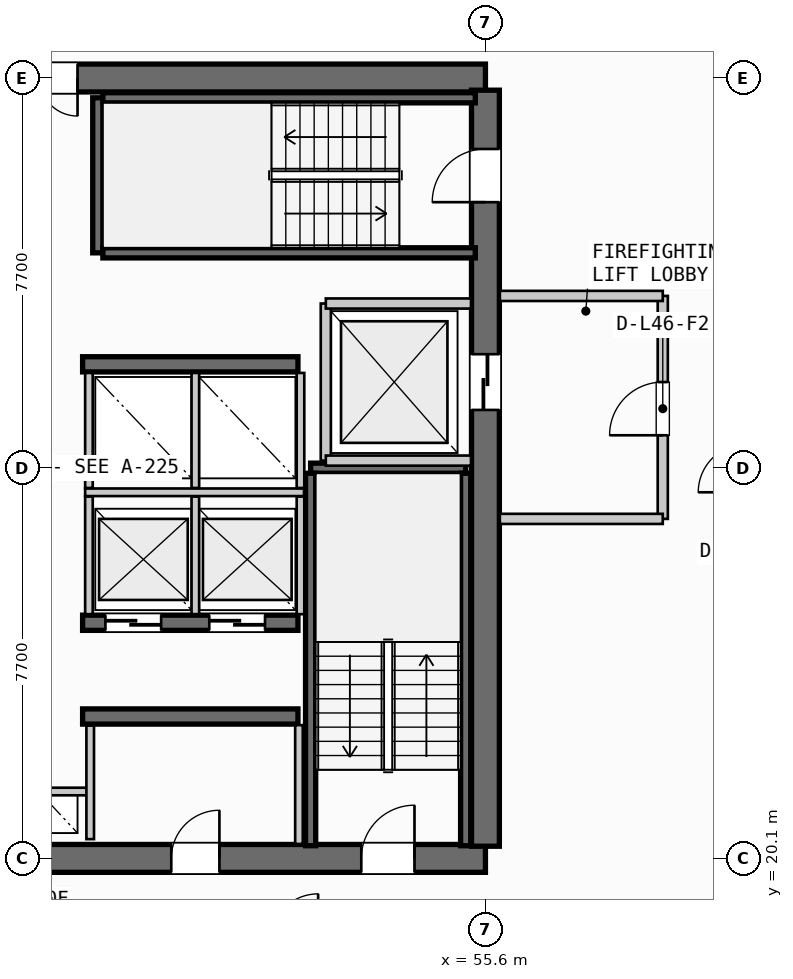
"""IFC4 building model, lengths in metres.
Left out: names, types, materials, properties, quantities, classifications, styles, units other than length and angle.
Written with IfcOpenShell. Run it as: python <this file> out.ifc"""

import sys

from ifc_helpers import new_model, si_unit, direction, frame, frame_2d, origin, place, context, subcontext, project, spatial, rectangle, extrude, source, transform, mapped, element, fill, save


model = new_model("IFC4")
c1 = context("Model", 3, precision=1e-05, world=origin(), true_north=direction((0.0, 1.0)))
c2 = subcontext(c1, "Body", "Model", "MODEL_VIEW")
j1 = project(units=[si_unit("LENGTHUNIT", "METRE"), si_unit("PLANEANGLEUNIT", "RADIAN")], contexts=[c1])
p1 = place(None, origin())
s1 = spatial("IfcSite", under=j1, at=p1, CompositionType="ELEMENT")
p2 = place(p1, origin())
s2 = spatial("IfcBuilding", under=s1, at=p2, CompositionType="ELEMENT")
p3 = place(p2, frame((0.0, 0.0, 179.9)))
s3 = spatial("IfcBuildingStorey", under=s2, at=p3, CompositionType="ELEMENT", Elevation=179.9)
p4 = place(p3, frame((38.0, 20.1, 0.0), z_axis=(0.0, 0.0, 1.0), x_axis=(1.0, 0.0, 0.0)))
e1 = element("IfcWall", 1, at=p4, inside=s3, PredefinedType="SHEAR", context=c2, shape_type="SweptSolid", body=[
    extrude(rectangle(XDim=17.6, YDim=0.55, at=frame_2d((8.8, 0.0))), origin(), (0.0, 0.0, 1.0), 3.26),
])
p5 = place(p4, frame((1.4, 0.0, 0.0)))
e2 = element("IfcOpeningElement", 2, at=p5, cuts=e1, PredefinedType="OPENING", context=c2, shape_type="SweptSolid", body=[
    extrude(rectangle(XDim=1.05, YDim=2.15, at=frame_2d((0.525, 1.075))), frame((0.0, 0.285, 0.0), z_axis=(0.0, -1.0, 0.0), x_axis=(1.0, 0.0, 0.0)), (0.0, 0.0, 1.0), 0.57),
])
p6 = place(p4, frame((15.15, 0.0, 0.0)))
e3 = element("IfcOpeningElement", 3, at=p6, cuts=e1, PredefinedType="OPENING", context=c2, shape_type="SweptSolid", body=[
    extrude(rectangle(XDim=1.05, YDim=2.15, at=frame_2d((0.525, 1.075))), frame((0.0, 0.285, 0.0), z_axis=(0.0, -1.0, 0.0), x_axis=(1.0, 0.0, 0.0)), (0.0, 0.0, 1.0), 0.57),
])
p7 = place(p4, frame((5.25, 0.0, 0.0)))
e4 = element("IfcOpeningElement", 4, at=p7, cuts=e1, PredefinedType="OPENING", context=c2, shape_type="SweptSolid", body=[
    extrude(rectangle(XDim=0.95, YDim=2.15, at=frame_2d((0.475, 1.075))), frame((0.0, 0.285, 0.0), z_axis=(0.0, -1.0, 0.0), x_axis=(1.0, 0.0, 0.0)), (0.0, 0.0, 1.0), 0.57),
])
p8 = place(p4, frame((11.4, 0.0, 0.0)))
e5 = element("IfcOpeningElement", 5, at=p8, cuts=e1, PredefinedType="OPENING", context=c2, shape_type="SweptSolid", body=[
    extrude(rectangle(XDim=0.95, YDim=2.15, at=frame_2d((0.475, 1.075))), frame((0.0, 0.285, 0.0), z_axis=(0.0, -1.0, 0.0), x_axis=(1.0, 0.0, 0.0)), (0.0, 0.0, 1.0), 0.57),
])
p9 = place(p3, frame((55.6, 35.5, 0.0), z_axis=(0.0, 0.0, 1.0), x_axis=(-1.0, 0.0, 0.0)))
e6 = element("IfcWall", 6, at=p9, inside=s3, PredefinedType="SHEAR", context=c2, shape_type="SweptSolid", body=[
    extrude(rectangle(XDim=17.6, YDim=0.55, at=frame_2d((8.8, 0.0))), origin(), (0.0, 0.0, 1.0), 3.26),
])
p10 = place(p9, frame((8.05, 0.0, 0.0)))
e7 = element("IfcOpeningElement", 7, at=p10, cuts=e6, PredefinedType="OPENING", context=c2, shape_type="SweptSolid", body=[
    extrude(rectangle(XDim=1.5, YDim=2.2, at=frame_2d((0.75, 1.1))), frame((0.0, 0.285, 0.0), z_axis=(0.0, -1.0, 0.0), x_axis=(1.0, 0.0, 0.0)), (0.0, 0.0, 1.0), 0.57),
])
p11 = place(p9, frame((15.1, 0.0, 0.0)))
e8 = element("IfcOpeningElement", 8, at=p11, cuts=e6, PredefinedType="OPENING", context=c2, shape_type="SweptSolid", body=[
    extrude(rectangle(XDim=0.95, YDim=2.15, at=frame_2d((0.475, 1.075))), frame((0.0, 0.285, 0.0), z_axis=(0.0, -1.0, 0.0), x_axis=(1.0, 0.0, 0.0)), (0.0, 0.0, 1.0), 0.57),
])
p12 = place(p9, frame((12.6, 0.0, 0.0)))
e9 = element("IfcOpeningElement", 9, at=p12, cuts=e6, PredefinedType="OPENING", context=c2, shape_type="SweptSolid", body=[
    extrude(rectangle(XDim=0.95, YDim=2.15, at=frame_2d((0.475, 1.075))), frame((0.0, 0.285, 0.0), z_axis=(0.0, -1.0, 0.0), x_axis=(1.0, 0.0, 0.0)), (0.0, 0.0, 1.0), 0.57),
])
p13 = place(p9, frame((10.45, 0.0, 0.0)))
e10 = element("IfcOpeningElement", 10, at=p13, cuts=e6, PredefinedType="OPENING", context=c2, shape_type="SweptSolid", body=[
    extrude(rectangle(XDim=0.95, YDim=2.15, at=frame_2d((0.475, 1.075))), frame((0.0, 0.285, 0.0), z_axis=(0.0, -1.0, 0.0), x_axis=(1.0, 0.0, 0.0)), (0.0, 0.0, 1.0), 0.57),
])
p14 = place(p3, frame((55.6, 20.34, 0.0), z_axis=(0.0, 0.0, 1.0), x_axis=(0.0, 1.0, 0.0)))
e11 = element("IfcWall", 11, at=p14, inside=s3, PredefinedType="SHEAR", context=c2, shape_type="SweptSolid", body=[
    extrude(rectangle(XDim=14.92, YDim=0.55, at=frame_2d((7.46, 0.0))), origin(), (0.0, 0.0, 1.0), 3.26),
])
p15 = place(p14, frame((12.71, 0.0, 0.0)))
e12 = element("IfcOpeningElement", 12, at=p15, cuts=e11, PredefinedType="OPENING", context=c2, shape_type="SweptSolid", body=[
    extrude(rectangle(XDim=1.05, YDim=2.15, at=frame_2d((0.525, 1.075))), frame((0.0, 0.285, 0.0), z_axis=(0.0, -1.0, 0.0), x_axis=(1.0, 0.0, 0.0)), (0.0, 0.0, 1.0), 0.57),
])
p16 = place(p14, frame((8.61, 0.0, 0.0)))
e13 = element("IfcOpeningElement", 13, at=p16, cuts=e11, PredefinedType="OPENING", context=c2, shape_type="SweptSolid", body=[
    extrude(rectangle(XDim=1.1, YDim=2.2, at=frame_2d((0.55, 1.1))), frame((0.0, 0.285, 0.0), z_axis=(0.0, -1.0, 0.0), x_axis=(1.0, 0.0, 0.0)), (0.0, 0.0, 1.0), 0.57),
])
p17 = place(p3, frame((47.65, 22.9, 0.0), z_axis=(0.0, 0.0, 1.0), x_axis=(1.0, 0.0, 0.0)))
e14 = element("IfcWall", 14, at=p17, inside=s3, PredefinedType="SHEAR", context=c2, shape_type="SweptSolid", body=[
    extrude(rectangle(XDim=4.25, YDim=0.3, at=frame_2d((2.125, 0.0))), origin(), (0.0, 0.0, 1.0), 3.26),
])
p18 = place(p3, frame((47.65, 24.75, 0.0), z_axis=(0.0, 0.0, 1.0), x_axis=(1.0, 0.0, 0.0)))
e15 = element("IfcWall", 15, at=p18, inside=s3, PredefinedType="SHEAR", context=c2, shape_type="SweptSolid", body=[
    extrude(rectangle(XDim=4.25, YDim=0.3, at=frame_2d((2.125, 0.0))), origin(), (0.0, 0.0, 1.0), 3.26),
])
p19 = place(p18, frame((0.45, 0.0, 0.0)))
e16 = element("IfcOpeningElement", 16, at=p19, cuts=e15, PredefinedType="OPENING", context=c2, shape_type="SweptSolid", body=[
    extrude(rectangle(XDim=1.1, YDim=2.2, at=frame_2d((0.55, 1.1))), frame((0.0, 0.16, 0.0), z_axis=(0.0, -1.0, 0.0), x_axis=(1.0, 0.0, 0.0)), (0.0, 0.0, 1.0), 0.32),
])
p20 = place(p18, frame((2.5, 0.0, 0.0)))
e17 = element("IfcOpeningElement", 17, at=p20, cuts=e15, PredefinedType="OPENING", context=c2, shape_type="SweptSolid", body=[
    extrude(rectangle(XDim=1.1, YDim=2.2, at=frame_2d((0.55, 1.1))), frame((0.0, 0.16, 0.0), z_axis=(0.0, -1.0, 0.0), x_axis=(1.0, 0.0, 0.0)), (0.0, 0.0, 1.0), 0.32),
])
p21 = place(p3, frame((47.65, 29.85, 0.0), z_axis=(0.0, 0.0, 1.0), x_axis=(1.0, 0.0, 0.0)))
e18 = element("IfcWall", 18, at=p21, inside=s3, PredefinedType="SHEAR", context=c2, shape_type="SweptSolid", body=[
    extrude(rectangle(XDim=4.25, YDim=0.3, at=frame_2d((2.125, 0.0))), origin(), (0.0, 0.0, 1.0), 3.26),
])
p22 = place(p3, frame((52.15, 27.8, 0.0), z_axis=(0.0, 0.0, 1.0), x_axis=(1.0, 0.0, 0.0)))
e19 = element("IfcWall", 19, at=p22, inside=s3, PredefinedType="SHEAR", context=c2, shape_type="SweptSolid", body=[
    extrude(rectangle(XDim=3.06, YDim=0.2, at=frame_2d((1.53, 0.0))), origin(), (0.0, 0.0, 1.0), 3.26),
])
for number, where, z_axis, x_axis in (
    (20, (55.21, 27.7, 0.0), (0.0, 0.0, 1.0), (0.0, -1.0, 0.0)),
    (21, (52.15, 20.35, 0.0), (0.0, 0.0, 1.0), (0.0, 1.0, 0.0)),
):
    element("IfcWall", number, at=place(p3, frame(where, z_axis=z_axis, x_axis=x_axis)), inside=s3, PredefinedType="SHEAR", context=c2, shape_type="SweptSolid", body=[
        extrude(rectangle(XDim=7.35, YDim=0.2, at=frame_2d((3.675, 0.0))), origin(), (0.0, 0.0, 1.0), 3.26),
    ])
p23 = place(p3, frame((47.95, 32.05, 0.0), z_axis=(0.0, 0.0, 1.0), x_axis=(0.0, 1.0, 0.0)))
e22 = element("IfcWall", 22, at=p23, inside=s3, PredefinedType="SHEAR", context=c2, shape_type="SweptSolid", body=[
    extrude(rectangle(XDim=3.06, YDim=0.2, at=frame_2d((1.53, 0.0))), origin(), (0.0, 0.0, 1.0), 3.26),
])
for number, where, z_axis, x_axis in (
    (23, (48.05, 35.11, 0.0), (0.0, 0.0, 1.0), (1.0, 0.0, 0.0)),
    (24, (55.4, 32.05, 0.0), (0.0, 0.0, 1.0), (-1.0, 0.0, 0.0)),
):
    element("IfcWall", number, at=place(p3, frame(where, z_axis=z_axis, x_axis=x_axis)), inside=s3, PredefinedType="SHEAR", context=c2, shape_type="SweptSolid", body=[
        extrude(rectangle(XDim=7.35, YDim=0.2, at=frame_2d((3.675, 0.0))), origin(), (0.0, 0.0, 1.0), 3.26),
    ])
p24 = place(p3, frame((45.8, 21.42, 0.0), z_axis=(0.0, 0.0, 1.0), x_axis=(1.0, 0.0, 0.0)))
e25 = element("IfcWall", 25, at=p24, inside=s3, PredefinedType="PARTITIONING", context=c2, shape_type="SweptSolid", body=[
    extrude(rectangle(XDim=2.0, YDim=0.15, at=frame_2d((1.0, 0.0))), origin(), (0.0, 0.0, 1.0), 2.28),
])
p25 = place(p3, frame((47.8, 20.48, 0.0), z_axis=(0.0, 0.0, 1.0), x_axis=(0.0, 1.0, 0.0)))
e26 = element("IfcWall", 26, at=p25, inside=s3, PredefinedType="PARTITIONING", context=c2, shape_type="SweptSolid", body=[
    extrude(rectangle(XDim=2.24, YDim=0.15, at=frame_2d((1.12, 0.0))), origin(), (0.0, 0.0, 1.0), 2.28),
])
p26 = place(p3, frame((52.45, 27.95, 0.0), z_axis=(0.0, 0.0, 1.0), x_axis=(0.0, 1.0, 0.0)))
e27 = element("IfcWall", 27, at=p26, inside=s3, PredefinedType="PARTITIONING", context=c2, shape_type="SweptSolid", body=[
    extrude(rectangle(XDim=3.1, YDim=0.2, at=frame_2d((1.55, 0.0))), origin(), (0.0, 0.0, 1.0), 2.28),
])
for number, where, z_axis, x_axis in (
    (28, (52.45, 27.95, 0.0), (0.0, 0.0, 1.0), (1.0, 0.0, 0.0)),
    (29, (52.45, 31.05, 0.0), (0.0, 0.0, 1.0), (1.0, 0.0, 0.0)),
):
    element("IfcWall", number, at=place(p3, frame(where, z_axis=z_axis, x_axis=x_axis)), inside=s3, PredefinedType="PARTITIONING", context=c2, shape_type="SweptSolid", body=[
        extrude(rectangle(XDim=2.865, YDim=0.2, at=frame_2d((1.433, 0.0))), origin(), (0.0, 0.0, 1.0), 2.28),
    ])
p27 = place(p3, frame((59.1, 26.8, 0.0), z_axis=(0.0, 0.0, 1.0), x_axis=(0.0, 1.0, 0.0)))
e30 = element("IfcWall", 30, at=p27, inside=s3, PredefinedType="PARTITIONING", context=c2, shape_type="SweptSolid", body=[
    extrude(rectangle(XDim=4.4, YDim=0.2, at=frame_2d((2.2, 0.0))), origin(), (0.0, 0.0, 1.0), 2.28),
])
p28 = place(p27, frame((1.65, 0.0, 0.0)))
e31 = element("IfcOpeningElement", 31, at=p28, cuts=e30, PredefinedType="OPENING", context=c2, shape_type="SweptSolid", body=[
    extrude(rectangle(XDim=1.05, YDim=2.15, at=frame_2d((0.525, 1.075))), frame((0.0, 0.11, 0.0), z_axis=(0.0, -1.0, 0.0), x_axis=(1.0, 0.0, 0.0)), (0.0, 0.0, 1.0), 0.22),
])
for number, where, z_axis, x_axis in (
    (32, (55.885, 26.8, 0.0), (0.0, 0.0, 1.0), (1.0, 0.0, 0.0)),
    (33, (55.885, 31.2, 0.0), (0.0, 0.0, 1.0), (1.0, 0.0, 0.0)),
):
    element("IfcWall", number, at=place(p3, frame(where, z_axis=z_axis, x_axis=x_axis)), inside=s3, PredefinedType="PARTITIONING", context=c2, shape_type="SweptSolid", body=[
        extrude(rectangle(XDim=3.215, YDim=0.2, at=frame_2d((1.607, 0.0))), origin(), (0.0, 0.0, 1.0), 2.28),
    ])
p29 = place(p3, frame((51.92, 20.385, 0.0), z_axis=(0.0, 0.0, 1.0), x_axis=(0.0, 1.0, 0.0)))
e34 = element("IfcWall", 34, at=p29, inside=s3, PredefinedType="PARTITIONING", context=c2, shape_type="SweptSolid", body=[
    extrude(rectangle(XDim=2.345, YDim=0.15, at=frame_2d((1.172, 0.0))), origin(), (0.0, 0.0, 1.0), 2.28),
])
p30 = place(p3, frame((47.7, 27.325, 0.0), z_axis=(0.0, 0.0, 1.0), x_axis=(1.0, 0.0, 0.0)))
e35 = element("IfcWall", 35, at=p30, inside=s3, PredefinedType="PARTITIONING", context=c2, shape_type="SweptSolid", body=[
    extrude(rectangle(XDim=4.32, YDim=0.15, at=frame_2d((2.16, 0.0))), origin(), (0.0, 0.0, 1.0), 2.28),
])
for number, where, z_axis, x_axis in (
    (36, (47.775, 24.92, 0.0), (0.0, 0.0, 1.0), (0.0, 1.0, 0.0)),
    (37, (49.875, 24.92, 0.0), (0.0, 0.0, 1.0), (0.0, 1.0, 0.0)),
    (38, (51.95, 24.92, 0.0), (0.0, 0.0, 1.0), (0.0, 1.0, 0.0)),
):
    element("IfcWall", number, at=place(p3, frame(where, z_axis=z_axis, x_axis=x_axis)), inside=s3, PredefinedType="PARTITIONING", context=c2, shape_type="SweptSolid", body=[
        extrude(rectangle(XDim=2.32, YDim=0.15, at=frame_2d((1.16, 0.0))), origin(), (0.0, 0.0, 1.0), 2.28),
    ])
for number, where, z_axis, x_axis in (
    (39, (47.775, 27.41, 0.0), (0.0, 0.0, 1.0), (0.0, 1.0, 0.0)),
    (40, (49.875, 27.41, 0.0), (0.0, 0.0, 1.0), (0.0, 1.0, 0.0)),
    (41, (51.95, 27.41, 0.0), (0.0, 0.0, 1.0), (0.0, 1.0, 0.0)),
):
    element("IfcWall", number, at=place(p3, frame(where, z_axis=z_axis, x_axis=x_axis)), inside=s3, PredefinedType="PARTITIONING", context=c2, shape_type="SweptSolid", body=[
        extrude(rectangle(XDim=2.27, YDim=0.15, at=frame_2d((1.135, 0.0))), origin(), (0.0, 0.0, 1.0), 2.28),
    ])
m1 = source(origin(), c2, "Body", "SweptSolid", [
    extrude(rectangle(XDim=1.05, YDim=2.15, at=frame_2d((0.525, 1.075))), frame((0.0, 0.025, 0.0), z_axis=(0.0, -1.0, 0.0), x_axis=(1.0, 0.0, 0.0)), (0.0, 0.0, 1.0), 0.05),
])
p31 = place(p6, origin())
e42 = element("IfcDoor", 42, at=p31, inside=s3, OperationType="SINGLE_SWING_RIGHT", PredefinedType="DOOR", context=c2, shape_type="MappedRepresentation", body=[
    mapped(m1, transform((0.0, 0.0, 0.0), scale=1.0)),
])
fill(e3, e42)
p32 = place(p15, origin())
e43 = element("IfcDoor", 43, at=p32, inside=s3, OperationType="SINGLE_SWING_LEFT", PredefinedType="DOOR", context=c2, shape_type="MappedRepresentation", body=[
    mapped(m1, transform((0.0, 0.0, 0.0), scale=1.0)),
])
fill(e12, e43)
m2 = source(origin(), c2, "Body", "SweptSolid", [
    extrude(rectangle(XDim=1.5, YDim=2.2, at=frame_2d((0.75, 1.1))), frame((0.0, 0.025, 0.0), z_axis=(0.0, -1.0, 0.0), x_axis=(1.0, 0.0, 0.0)), (0.0, 0.0, 1.0), 0.05),
])
p33 = place(p10, origin())
e44 = element("IfcDoor", 44, at=p33, inside=s3, OperationType="DOUBLE_DOOR_SINGLE_SWING", PredefinedType="DOOR", context=c2, shape_type="MappedRepresentation", body=[
    mapped(m2, transform((0.0, 0.0, 0.0), scale=1.0)),
])
fill(e7, e44)
m3 = source(origin(), c2, "Body", "SweptSolid", [
    extrude(rectangle(XDim=1.1, YDim=2.2, at=frame_2d((0.55, 1.1))), frame((0.0, 0.025, 0.0), z_axis=(0.0, -1.0, 0.0), x_axis=(1.0, 0.0, 0.0)), (0.0, 0.0, 1.0), 0.05),
])
p34 = place(p16, origin())
e45 = element("IfcDoor", 45, at=p34, inside=s3, OperationType="SLIDING_TO_RIGHT", PredefinedType="DOOR", context=c2, shape_type="MappedRepresentation", body=[
    mapped(m3, transform((0.0, 0.0, 0.0), scale=1.0)),
])
fill(e13, e45)
m4 = source(origin(), c2, "Body", "SweptSolid", [
    extrude(rectangle(XDim=0.95, YDim=2.15, at=frame_2d((0.475, 1.075))), frame((0.0, 0.025, 0.0), z_axis=(0.0, -1.0, 0.0), x_axis=(1.0, 0.0, 0.0)), (0.0, 0.0, 1.0), 0.05),
])
p35 = place(p8, origin())
e46 = element("IfcDoor", 46, at=p35, inside=s3, OperationType="SINGLE_SWING_RIGHT", PredefinedType="DOOR", context=c2, shape_type="MappedRepresentation", body=[
    mapped(m4, transform((0.0, 0.0, 0.0), scale=1.0)),
])
fill(e5, e46)
p36 = place(p19, origin())
e47 = element("IfcDoor", 47, at=p36, inside=s3, OperationType="SLIDING_TO_RIGHT", PredefinedType="DOOR", context=c2, shape_type="MappedRepresentation", body=[
    mapped(m3, transform((0.0, 0.0, 0.0), scale=1.0)),
])
fill(e16, e47)
p37 = place(p20, origin())
e48 = element("IfcDoor", 48, at=p37, inside=s3, OperationType="SLIDING_TO_RIGHT", PredefinedType="DOOR", context=c2, shape_type="MappedRepresentation", body=[
    mapped(m3, transform((0.0, 0.0, 0.0), scale=1.0)),
])
fill(e17, e48)
p38 = place(p28, origin())
e49 = element("IfcDoor", 49, at=p38, inside=s3, OperationType="SINGLE_SWING_LEFT", PredefinedType="DOOR", context=c2, shape_type="MappedRepresentation", body=[
    mapped(m1, transform((0.0, 0.0, 0.0), scale=1.0)),
])
fill(e31, e49)
save(model, sys.argv[1])
